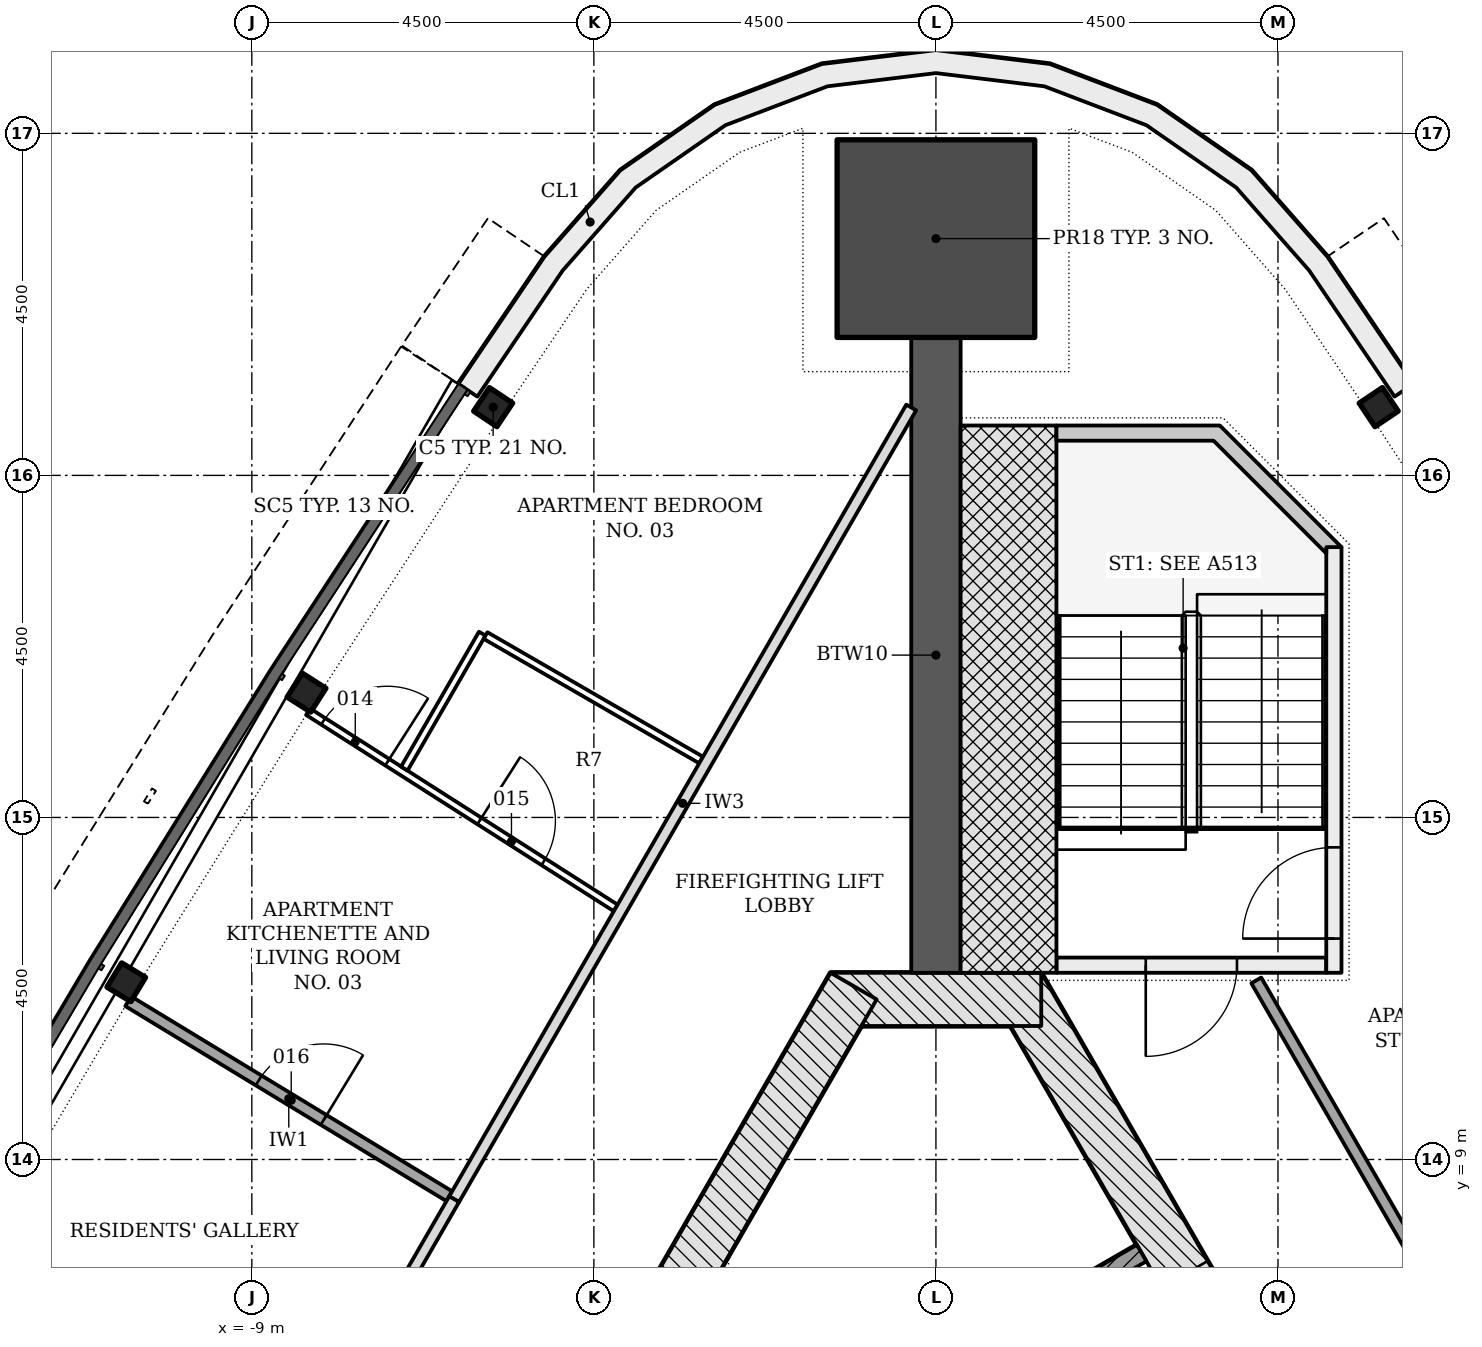
"""IFC4 building model, lengths in metres.
Left out: names, types, materials, properties, quantities, classifications, styles, units other than length and angle.
Written with IfcOpenShell. Run it as: python <this file> out.ifc"""

import sys

from ifc_helpers import new_model, si_unit, direction, frame, frame_2d, origin, origin_2d, place, context, subcontext, project, spatial, polyline, rectangle, i_section, outline, extrude, element, fill, save


model = new_model("IFC4")
c1 = context("Model", 3, precision=1e-05, world=origin(), true_north=direction((0.0, 1.0)))
c2 = subcontext(c1, "Body", "Model", "MODEL_VIEW")
j1 = project(units=[si_unit("LENGTHUNIT", "METRE"), si_unit("PLANEANGLEUNIT", "RADIAN")], contexts=[c1])
p1 = place(None, origin())
s1 = spatial("IfcSite", under=j1, at=p1, CompositionType="ELEMENT")
p2 = place(p1, origin())
s2 = spatial("IfcBuilding", under=s1, at=p2, CompositionType="ELEMENT")
p3 = place(p2, frame((0.0, 0.0, 214.8)))
s3 = spatial("IfcBuildingStorey", under=s2, at=p3, CompositionType="ELEMENT", Elevation=214.8)
p4 = place(p3, frame((10.311, -4.703, -0.2), z_axis=(0.0, 0.0, 1.0), x_axis=(-0.500001446645, 0.866024568562, 0.0)))
e1 = element("IfcWall", 1, at=p4, inside=s3, PredefinedType="SHEAR", context=c2, shape_type="SweptSolid", body=[
    extrude(rectangle(XDim=18.458, YDim=0.7, at=frame_2d((9.229, 0.0))), origin(), (0.0, 0.0, 1.0), 3.6),
])
p5 = place(p4, frame((4.379, 0.0, 0.2)))
e2 = element("IfcOpeningElement", 2, at=p5, cuts=e1, PredefinedType="OPENING", context=c2, shape_type="SweptSolid", body=[
    extrude(rectangle(XDim=1.1, YDim=2.1, at=frame_2d((0.55, 1.05))), frame((0.0, 0.36, 0.0), z_axis=(0.0, -1.0, 0.0), x_axis=(1.0, 0.0, 0.0)), (0.0, 0.0, 1.0), 0.72),
])
p6 = place(p4, frame((6.529, 0.0, 0.2)))
e3 = element("IfcOpeningElement", 3, at=p6, cuts=e1, PredefinedType="OPENING", context=c2, shape_type="SweptSolid", body=[
    extrude(rectangle(XDim=1.1, YDim=2.1, at=frame_2d((0.55, 1.05))), frame((0.0, 0.36, 0.0), z_axis=(0.0, -1.0, 0.0), x_axis=(1.0, 0.0, 0.0)), (0.0, 0.0, 1.0), 0.72),
])
p7 = place(p4, frame((8.679, 0.0, 0.2)))
e4 = element("IfcOpeningElement", 4, at=p7, cuts=e1, PredefinedType="OPENING", context=c2, shape_type="SweptSolid", body=[
    extrude(rectangle(XDim=1.1, YDim=2.1, at=frame_2d((0.55, 1.05))), frame((0.0, 0.36, 0.0), z_axis=(0.0, -1.0, 0.0), x_axis=(1.0, 0.0, 0.0)), (0.0, 0.0, 1.0), 0.72),
])
p8 = place(p4, frame((10.829, 0.0, 0.2)))
e5 = element("IfcOpeningElement", 5, at=p8, cuts=e1, PredefinedType="OPENING", context=c2, shape_type="SweptSolid", body=[
    extrude(rectangle(XDim=1.1, YDim=2.1, at=frame_2d((0.55, 1.05))), frame((0.0, 0.36, 0.0), z_axis=(0.0, -1.0, 0.0), x_axis=(1.0, 0.0, 0.0)), (0.0, 0.0, 1.0), 0.72),
])
p9 = place(p4, frame((12.979, 0.0, 0.2)))
e6 = element("IfcOpeningElement", 6, at=p9, cuts=e1, PredefinedType="OPENING", context=c2, shape_type="SweptSolid", body=[
    extrude(rectangle(XDim=1.1, YDim=2.1, at=frame_2d((0.55, 1.05))), frame((0.0, 0.36, 0.0), z_axis=(0.0, -1.0, 0.0), x_axis=(1.0, 0.0, 0.0)), (0.0, 0.0, 1.0), 0.72),
])
p10 = place(p3, frame((1.386, 11.106, -0.2), z_axis=(0.0, 0.0, 1.0), x_axis=(-1.0, 0.0, 0.0)))
e7 = element("IfcWall", 7, at=p10, inside=s3, PredefinedType="SHEAR", context=c2, shape_type="SweptSolid", body=[
    extrude(rectangle(XDim=2.771, YDim=0.7, at=frame_2d((1.386, 0.0))), origin(), (0.0, 0.0, 1.0), 3.6),
])
p11 = place(p3, frame((-1.083, 11.281, -0.2), z_axis=(0.0, 0.0, 1.0), x_axis=(-0.500001446645, -0.866024568562, 0.0)))
e8 = element("IfcWall", 8, at=p11, inside=s3, PredefinedType="SHEAR", context=c2, shape_type="SweptSolid", body=[
    extrude(rectangle(XDim=18.458, YDim=0.7, at=frame_2d((9.229, 0.0))), origin(), (0.0, 0.0, 1.0), 3.6),
])
p12 = place(p11, frame((8.979, 0.0, 0.2)))
e9 = element("IfcOpeningElement", 9, at=p12, cuts=e8, PredefinedType="OPENING", context=c2, shape_type="SweptSolid", body=[
    extrude(rectangle(XDim=1.2, YDim=2.1, at=frame_2d((0.6, 1.05))), frame((0.0, 0.36, 0.0), z_axis=(0.0, -1.0, 0.0), x_axis=(1.0, 0.0, 0.0)), (0.0, 0.0, 1.0), 0.72),
])
p13 = place(p11, frame((11.029, 0.0, 0.2)))
e10 = element("IfcOpeningElement", 10, at=p13, cuts=e8, PredefinedType="OPENING", context=c2, shape_type="SweptSolid", body=[
    extrude(rectangle(XDim=1.2, YDim=2.1, at=frame_2d((0.6, 1.05))), frame((0.0, 0.36, 0.0), z_axis=(0.0, -1.0, 0.0), x_axis=(1.0, 0.0, 0.0)), (0.0, 0.0, 1.0), 0.72),
])
p14 = place(p3, frame((0.0, 11.456, -0.2), z_axis=(0.0, 0.0, 1.0), x_axis=(0.0, 1.0, 0.0)))
e11 = element("IfcWall", 11, at=p14, inside=s3, PredefinedType="SHEAR", context=c2, shape_type="SweptSolid", body=[
    extrude(rectangle(XDim=8.359, YDim=0.65, at=frame_2d((4.179, 0.0))), origin(), (0.0, 0.0, 1.0), 3.6),
])
p15 = place(p3, frame((0.0, 21.115, -0.2), z_axis=(0.0, 0.0, 1.0), x_axis=(0.0, 1.0, 0.0)))
e12 = element("IfcColumn", 12, at=p15, inside=s3, PredefinedType="COLUMN", context=c2, shape_type="SweptSolid", body=[
    extrude(rectangle(XDim=2.6, YDim=2.6, at=origin_2d()), origin(), (0.0, 0.0, 1.0), 3.6),
])
for number, where, z_axis, x_axis in (
    (13, (-5.825, 18.898, -0.2), (0.0, 0.0, 1.0), (-0.556, -0.831, 0.0)),
    (14, (-8.281, 15.142, -0.2), (0.0, 0.0, 1.0), (-0.538, -0.843, 0.0)),
    (15, (-10.652, 11.332, -0.2), (0.0, 0.0, 1.0), (-0.519, -0.855, 0.0)),
    (16, (5.825, 18.898, -0.2), (0.0, 0.0, 1.0), (-0.556, 0.831, 0.0)),
):
    element("IfcColumn", number, at=place(p3, frame(where, z_axis=z_axis, x_axis=x_axis)), inside=s3, PredefinedType="COLUMN", context=c2, shape_type="SweptSolid", body=[
        extrude(i_section(OverallWidth=0.373, OverallDepth=0.368, WebThickness=0.015, FlangeThickness=0.024, FilletRadius=0.015, at=origin_2d()), origin(), (0.0, 0.0, 1.0), 3.6),
    ])
p16 = place(p3, origin())
e17 = element("IfcWall", 17, at=p16, inside=s3, PredefinedType="NOTDEFINED", context=c2, shape_type="SweptSolid", body=[
    extrude(outline(polyline([(6.282, 19.204), (5.149, 20.879), (4.151, 22.013), (2.911, 22.874), (1.499, 23.412), (0.0, 23.595), (-1.499, 23.412), (-2.911, 22.874), (-4.151, 22.013), (-5.149, 20.879), (-6.282, 19.204), (-6.034, 19.036), (-4.911, 20.695), (-3.95, 21.787), (-2.77, 22.607), (-1.427, 23.119), (0.0, 23.293), (1.427, 23.119), (2.77, 22.607), (3.95, 21.787), (4.911, 20.695), (6.034, 19.036), (6.282, 19.204)])), origin(), (0.0, 0.0, 1.0), 3.3),
])
p17 = place(p3, frame((2.706, 7.769, -0.2), z_axis=(0.0, 0.0, 1.0), x_axis=(-0.866022959057, -0.500004234368, 0.0)))
e18 = element("IfcWall", 18, at=p17, inside=s3, PredefinedType="PARTITIONING", context=c2, shape_type="SweptSolid", body=[
    extrude(rectangle(XDim=2.5, YDim=0.25, at=frame_2d((1.25, 0.0))), origin(), (0.0, 0.0, 1.0), 3.6),
])
p18 = place(p3, frame((5.135, 11.556, -0.2), z_axis=(0.0, 0.0, 1.0), x_axis=(-1.0, 0.0, 0.0)))
e19 = element("IfcWall", 19, at=p18, inside=s3, PredefinedType="SHEAR", context=c2, shape_type="SweptSolid", body=[
    extrude(rectangle(XDim=3.55, YDim=0.2, at=frame_2d((1.775, 0.0))), origin(), (0.0, 0.0, 1.0), 3.6),
])
p19 = place(p18, frame((1.175, 0.0, 0.2)))
e20 = element("IfcOpeningElement", 20, at=p19, cuts=e19, PredefinedType="OPENING", context=c2, shape_type="SweptSolid", body=[
    extrude(rectangle(XDim=1.2, YDim=2.1, at=frame_2d((0.6, 1.05))), frame((0.0, 0.11, 0.0), z_axis=(0.0, -1.0, 0.0), x_axis=(1.0, 0.0, 0.0)), (0.0, 0.0, 1.0), 0.22),
])
p20 = place(p3, frame((5.236, 11.456, -0.2), z_axis=(0.0, 0.0, 1.0), x_axis=(0.0, 1.0, 0.0)))
e21 = element("IfcWall", 21, at=p20, inside=s3, PredefinedType="SHEAR", context=c2, shape_type="SweptSolid", body=[
    extrude(rectangle(XDim=5.6, YDim=0.2, at=frame_2d((2.8, 0.0))), origin(), (0.0, 0.0, 1.0), 3.6),
])
p21 = place(p20, frame((0.45, 0.0, 0.2)))
e22 = element("IfcOpeningElement", 22, at=p21, cuts=e21, PredefinedType="OPENING", context=c2, shape_type="SweptSolid", body=[
    extrude(rectangle(XDim=1.2, YDim=2.1, at=frame_2d((0.6, 1.05))), frame((0.0, 0.11, 0.0), z_axis=(0.0, -1.0, 0.0), x_axis=(1.0, 0.0, 0.0)), (0.0, 0.0, 1.0), 0.22),
])
p22 = place(p3, frame((0.955, 11.456, -0.2), z_axis=(0.0, 0.0, 1.0), x_axis=(0.0, 1.0, 0.0)))
e23 = element("IfcWall", 23, at=p22, inside=s3, PredefinedType="SHEAR", context=c2, shape_type="SweptSolid", body=[
    extrude(rectangle(XDim=7.2, YDim=1.261, at=frame_2d((3.6, 0.0))), origin(), (0.0, 0.0, 1.0), 3.6),
])
p23 = place(p3, frame((0.0, 0.0, -0.2)))
e24 = element("IfcWall", 24, at=p23, inside=s3, PredefinedType="SHEAR", context=c2, shape_type="SweptSolid", body=[
    extrude(outline(polyline([(5.336, 17.056), (3.736, 18.656), (1.586, 18.656), (1.586, 18.456), (3.653, 18.456), (5.135, 16.974), (5.135, 17.056), (5.135, 17.056), (5.135, 17.056), (5.135, 17.056), (5.135, 17.056), (5.135, 17.056), (5.135, 17.056), (5.135, 17.056), (5.135, 17.056), (5.135, 17.056), (5.135, 17.056), (5.135, 17.056), (5.135, 17.056), (5.135, 17.056), (5.135, 17.056), (5.135, 17.056), (5.135, 17.056), (5.336, 17.056)])), origin(), (0.0, 0.0, 1.0), 3.6),
])
p24 = place(p3, frame((7.979, 4.837, 0.0), z_axis=(0.0, 0.0, 1.0), x_axis=(-0.500014427086, 0.866017074142, 0.0)))
e25 = element("IfcWall", 25, at=p24, inside=s3, PredefinedType="PARTITIONING", context=c2, shape_type="SweptSolid", body=[
    extrude(rectangle(XDim=7.528, YDim=0.15, at=frame_2d((3.764, 0.0))), origin(), (0.0, 0.0, 1.0), 2.852),
])
p25 = place(p3, frame((-0.325, 18.894, 0.0), z_axis=(0.0, 0.0, 1.0), x_axis=(-0.50000126085, -0.866024675831, 0.0)))
e26 = element("IfcWall", 26, at=p25, inside=s3, PredefinedType="PARTITIONING", context=c2, shape_type="SweptSolid", body=[
    extrude(rectangle(XDim=12.027, YDim=0.15, at=frame_2d((6.013, 0.0))), origin(), (0.0, 0.0, 1.0), 2.852),
])
p26 = place(p3, frame((-10.626, 11.082, 0.0), z_axis=(0.0, 0.0, 1.0), x_axis=(0.854742891139, -0.519051625609, 0.0)))
e27 = element("IfcWall", 27, at=p26, inside=s3, PredefinedType="PARTITIONING", context=c2, shape_type="SweptSolid", body=[
    extrude(rectangle(XDim=4.941, YDim=0.15, at=frame_2d((2.471, 0.0))), origin(), (0.0, 0.0, 1.0), 3.4),
])
p27 = place(p26, frame((2.008, 0.0, 0.0)))
e28 = element("IfcOpeningElement", 28, at=p27, cuts=e27, PredefinedType="OPENING", context=c2, shape_type="SweptSolid", body=[
    extrude(rectangle(XDim=1.0, YDim=2.1, at=frame_2d((0.5, 1.05))), frame((0.0, 0.085, 0.0), z_axis=(0.0, -1.0, 0.0), x_axis=(1.0, 0.0, 0.0)), (0.0, 0.0, 1.0), 0.17),
])
p28 = place(p3, frame((-6.338, 8.478, 0.0), z_axis=(0.0, 0.0, 1.0), x_axis=(-0.500005971936, -0.866021955858, 0.0)))
e29 = element("IfcWall", 29, at=p28, inside=s3, PredefinedType="PARTITIONING", context=c2, shape_type="SweptSolid", body=[
    extrude(rectangle(XDim=4.373, YDim=0.15, at=frame_2d((2.187, 0.0))), origin(), (0.0, 0.0, 1.0), 2.852),
])
p29 = place(p28, frame((1.687, 0.0, 0.0)))
e30 = element("IfcOpeningElement", 30, at=p29, cuts=e29, PredefinedType="OPENING", context=c2, shape_type="SweptSolid", body=[
    extrude(rectangle(XDim=1.0, YDim=2.1, at=frame_2d((0.5, 1.05))), frame((0.0, 0.085, 0.0), z_axis=(0.0, -1.0, 0.0), x_axis=(1.0, 0.0, 0.0)), (0.0, 0.0, 1.0), 0.17),
])
p30 = place(p3, frame((-8.26, 14.891, 0.0), z_axis=(0.0, 0.0, 1.0), x_axis=(0.843047331612, -0.537839378125, 0.0)))
e31 = element("IfcWall", 31, at=p30, inside=s3, PredefinedType="PARTITIONING", context=c2, shape_type="SweptSolid", body=[
    extrude(rectangle(XDim=4.8, YDim=0.1, at=frame_2d((2.4, 0.0))), origin(), (0.0, 0.0, 1.0), 3.4),
])
p31 = place(p30, frame((0.236, 0.0, 0.0)))
e32 = element("IfcOpeningElement", 32, at=p31, cuts=e31, PredefinedType="OPENING", context=c2, shape_type="SweptSolid", body=[
    extrude(rectangle(XDim=1.0, YDim=2.1, at=frame_2d((0.5, 1.05))), frame((0.0, 0.06, 0.0), z_axis=(0.0, -1.0, 0.0), x_axis=(1.0, 0.0, 0.0)), (0.0, 0.0, 1.0), 0.12),
])
p32 = place(p30, frame((2.674, 0.0, 0.0)))
e33 = element("IfcOpeningElement", 33, at=p32, cuts=e31, PredefinedType="OPENING", context=c2, shape_type="SweptSolid", body=[
    extrude(rectangle(XDim=1.0, YDim=2.1, at=frame_2d((0.5, 1.05))), frame((0.0, 0.06, 0.0), z_axis=(0.0, -1.0, 0.0), x_axis=(1.0, 0.0, 0.0)), (0.0, 0.0, 1.0), 0.12),
])
p33 = place(p3, frame((-6.994, 14.143, 0.0), z_axis=(0.0, 0.0, 1.0), x_axis=(0.500097020274, 0.865969381856, 0.0)))
e34 = element("IfcWall", 34, at=p33, inside=s3, PredefinedType="PARTITIONING", context=c2, shape_type="SweptSolid", body=[
    extrude(rectangle(XDim=2.05, YDim=0.1, at=frame_2d((1.025, 0.0))), origin(), (0.0, 0.0, 1.0), 2.852),
])
p34 = place(p3, frame((-5.926, 15.893, 0.0), z_axis=(0.0, 0.0, 1.0), x_axis=(0.866027924134, -0.499995634601, 0.0)))
e35 = element("IfcWall", 35, at=p34, inside=s3, PredefinedType="PARTITIONING", context=c2, shape_type="SweptSolid", body=[
    extrude(rectangle(XDim=3.275, YDim=0.1, at=frame_2d((1.637, 0.0))), origin(), (0.0, 0.0, 1.0), 3.4),
])
p35 = place(p19, origin())
e36 = element("IfcDoor", 36, at=p35, inside=s3, OperationType="SINGLE_SWING_RIGHT", PredefinedType="DOOR", context=c2, shape_type="SweptSolid", body=[
    extrude(rectangle(XDim=1.2, YDim=2.1, at=frame_2d((0.6, 1.05))), frame((0.0, 0.025, 0.0), z_axis=(0.0, -1.0, 0.0), x_axis=(1.0, 0.0, 0.0)), (0.0, 0.0, 1.0), 0.05),
])
fill(e20, e36)
p36 = place(p21, origin())
e37 = element("IfcDoor", 37, at=p36, inside=s3, OperationType="SINGLE_SWING_LEFT", PredefinedType="DOOR", context=c2, shape_type="SweptSolid", body=[
    extrude(rectangle(XDim=1.2, YDim=2.1, at=frame_2d((0.6, 1.05))), frame((0.0, 0.025, 0.0), z_axis=(0.0, -1.0, 0.0), x_axis=(1.0, 0.0, 0.0)), (0.0, 0.0, 1.0), 0.05),
])
fill(e22, e37)
p37 = place(p31, origin())
e38 = element("IfcDoor", 38, at=p37, inside=s3, OperationType="SINGLE_SWING_RIGHT", PredefinedType="DOOR", context=c2, shape_type="SweptSolid", body=[
    extrude(rectangle(XDim=1.0, YDim=2.1, at=frame_2d((0.5, 1.05))), frame((0.0, 0.025, 0.0), z_axis=(0.0, -1.0, 0.0), x_axis=(1.0, 0.0, 0.0)), (0.0, 0.0, 1.0), 0.05),
])
fill(e32, e38)
p38 = place(p32, origin())
e39 = element("IfcDoor", 39, at=p38, inside=s3, OperationType="SINGLE_SWING_LEFT", PredefinedType="DOOR", context=c2, shape_type="SweptSolid", body=[
    extrude(rectangle(XDim=1.0, YDim=2.1, at=frame_2d((0.5, 1.05))), frame((0.0, 0.025, 0.0), z_axis=(0.0, -1.0, 0.0), x_axis=(1.0, 0.0, 0.0)), (0.0, 0.0, 1.0), 0.05),
])
fill(e33, e39)
p39 = place(p27, origin())
e40 = element("IfcDoor", 40, at=p39, inside=s3, OperationType="SINGLE_SWING_RIGHT", PredefinedType="DOOR", context=c2, shape_type="SweptSolid", body=[
    extrude(rectangle(XDim=1.0, YDim=2.1, at=frame_2d((0.5, 1.05))), frame((0.0, 0.025, 0.0), z_axis=(0.0, -1.0, 0.0), x_axis=(1.0, 0.0, 0.0)), (0.0, 0.0, 1.0), 0.05),
])
fill(e28, e40)
save(model, sys.argv[1])
